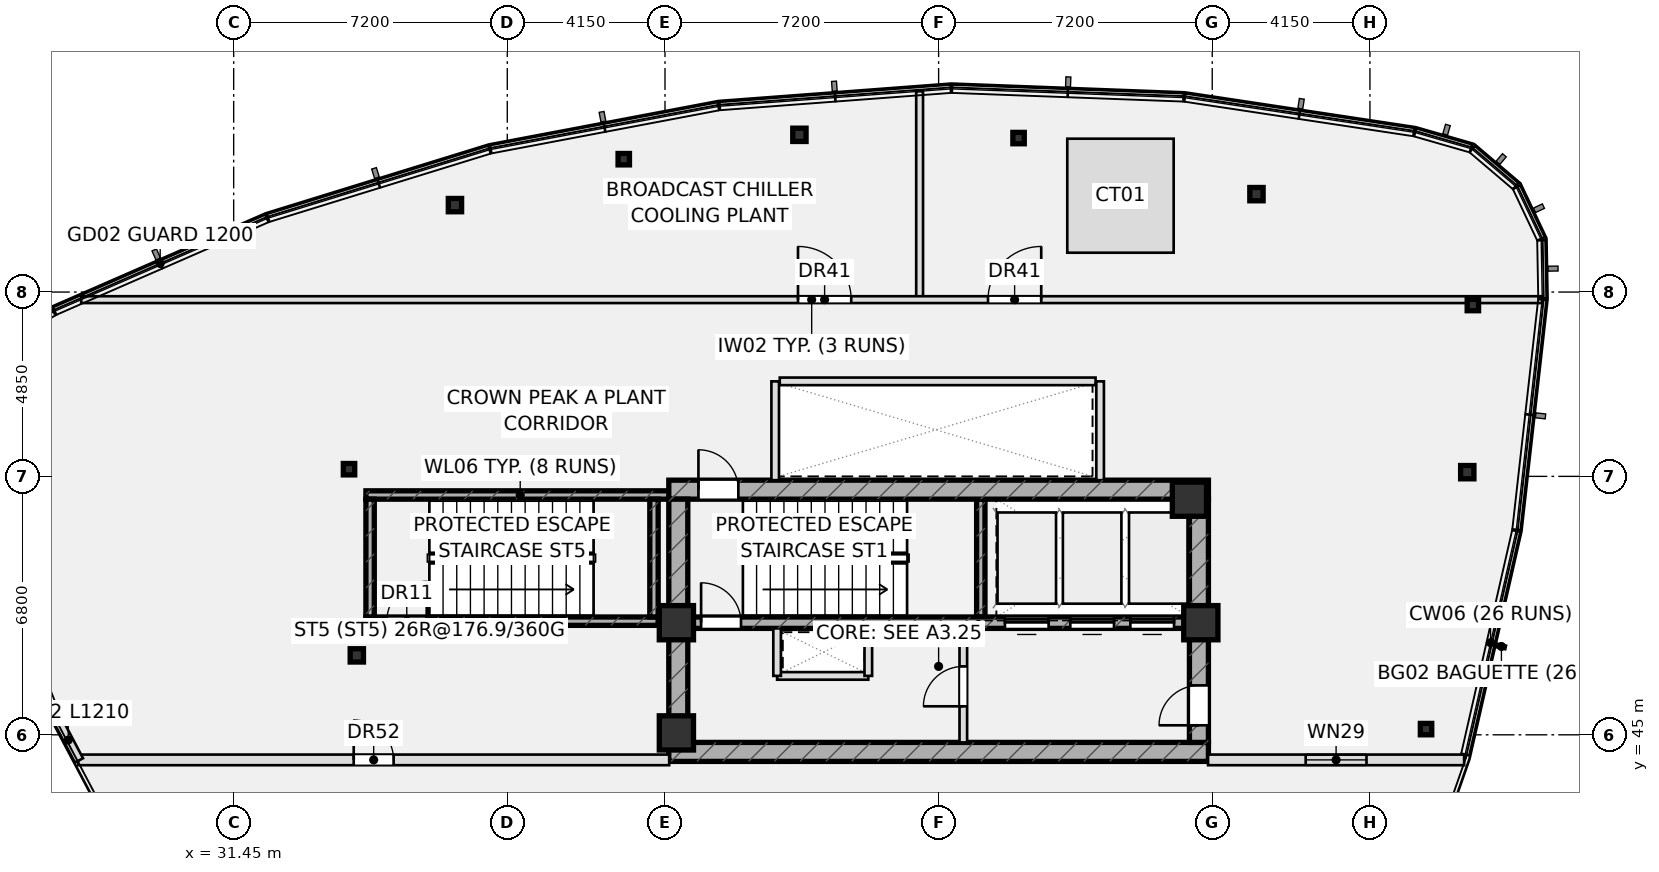
"""IFC4 building model, lengths in metres.
Left out: names, types, materials, properties, quantities, classifications, styles, units other than length and angle.
Written with IfcOpenShell. Run it as: python <this file> out.ifc"""

import sys

from ifc_helpers import new_model, si_unit, direction, frame, frame_2d, origin, origin_2d, place, context, subcontext, project, spatial, rectangle, hollow_rectangle, extrude, element, fill, save


model = new_model("IFC4")
c1 = context("Model", 3, precision=1e-05, world=origin(), true_north=direction((0.0, 1.0)))
c2 = subcontext(c1, "Body", "Model", "MODEL_VIEW")
j1 = project(units=[si_unit("LENGTHUNIT", "METRE"), si_unit("PLANEANGLEUNIT", "RADIAN")], contexts=[c1])
p1 = place(None, origin())
s1 = spatial("IfcSite", under=j1, at=p1, CompositionType="ELEMENT")
p2 = place(p1, origin())
s2 = spatial("IfcBuilding", under=s1, at=p2, CompositionType="ELEMENT")
p3 = place(p2, frame((0.0, 0.0, 332.1)))
s3 = spatial("IfcBuildingStorey", under=s2, at=p3, CompositionType="ELEMENT", Elevation=332.1)
p4 = place(p3, frame((51.11, 48.1, 0.0), z_axis=(0.0, 0.0, 1.0), x_axis=(0.0, 1.0, 0.0)))
e1 = element("IfcWall", 1, at=p4, inside=s3, PredefinedType="SHEAR", context=c2, shape_type="SweptSolid", body=[
    extrude(rectangle(XDim=3.1, YDim=0.22, at=frame_2d((1.55, 0.0))), origin(), (0.0, 0.0, 1.0), 4.25),
])
p5 = place(p3, frame((34.93, 47.99, 0.0), z_axis=(0.0, 0.0, 1.0), x_axis=(1.0, 0.0, 0.0)))
e2 = element("IfcWall", 2, at=p5, inside=s3, PredefinedType="SHEAR", context=c2, shape_type="SweptSolid", body=[
    extrude(rectangle(XDim=7.69, YDim=0.22, at=frame_2d((3.845, 0.0))), origin(), (0.0, 0.0, 1.0), 4.25),
])
p6 = place(p5, frame((0.55, 0.0, 0.0)))
e3 = element("IfcOpeningElement", 3, at=p6, cuts=e2, PredefinedType="OPENING", context=c2, shape_type="SweptSolid", body=[
    extrude(rectangle(XDim=1.05, YDim=2.2, at=frame_2d((0.525, 1.1))), frame((0.0, 0.12, 0.0), z_axis=(0.0, -1.0, 0.0), x_axis=(1.0, 0.0, 0.0)), (0.0, 0.0, 1.0), 0.24),
])
p7 = place(p3, frame((34.93, 51.31, 0.0), z_axis=(0.0, 0.0, 1.0), x_axis=(1.0, 0.0, 0.0)))
e4 = element("IfcWall", 4, at=p7, inside=s3, PredefinedType="SHEAR", context=c2, shape_type="SweptSolid", body=[
    extrude(rectangle(XDim=8.12, YDim=0.22, at=frame_2d((4.06, 0.0))), origin(), (0.0, 0.0, 1.0), 4.25),
])
for number, where, z_axis, x_axis in (
    (5, (42.51, 48.1, 0.0), (0.0, 0.0, 1.0), (0.0, 1.0, 0.0)),
    (6, (35.04, 48.1, 0.0), (0.0, 0.0, 1.0), (0.0, 1.0, 0.0)),
):
    element("IfcWall", number, at=place(p3, frame(where, z_axis=z_axis, x_axis=x_axis)), inside=s3, PredefinedType="SHEAR", context=c2, shape_type="SweptSolid", body=[
        extrude(rectangle(XDim=3.1, YDim=0.22, at=frame_2d((1.55, 0.0))), origin(), (0.0, 0.0, 1.0), 4.25),
    ])
p8 = place(p3, frame((42.9, 51.45, 0.0), z_axis=(0.0, 0.0, 1.0), x_axis=(1.0, 0.0, 0.0)))
e7 = element("IfcWall", 7, at=p8, inside=s3, PredefinedType="SHEAR", context=c2, shape_type="SweptSolid", body=[
    extrude(rectangle(XDim=14.2, YDim=0.5, at=frame_2d((7.1, 0.0))), origin(), (0.0, 0.0, 1.0), 4.25),
])
p9 = place(p8, frame((0.78, 0.0, 0.0)))
e8 = element("IfcOpeningElement", 8, at=p9, cuts=e7, PredefinedType="OPENING", context=c2, shape_type="SweptSolid", body=[
    extrude(rectangle(XDim=1.05, YDim=2.2, at=frame_2d((0.525, 1.1))), frame((0.0, 0.26, 0.0), z_axis=(0.0, -1.0, 0.0), x_axis=(1.0, 0.0, 0.0)), (0.0, 0.0, 1.0), 0.52),
])
p10 = place(p3, frame((42.9, 44.55, 0.0), z_axis=(0.0, 0.0, 1.0), x_axis=(1.0, 0.0, 0.0)))
e9 = element("IfcWall", 9, at=p10, inside=s3, PredefinedType="SHEAR", context=c2, shape_type="SweptSolid", body=[
    extrude(rectangle(XDim=14.2, YDim=0.5, at=frame_2d((7.1, 0.0))), origin(), (0.0, 0.0, 1.0), 4.25),
])
p11 = place(p3, frame((43.15, 44.8, 0.0), z_axis=(0.0, 0.0, 1.0), x_axis=(0.0, 1.0, 0.0)))
e10 = element("IfcWall", 10, at=p11, inside=s3, PredefinedType="SHEAR", context=c2, shape_type="SweptSolid", body=[
    extrude(rectangle(XDim=6.4, YDim=0.5, at=frame_2d((3.2, 0.0))), origin(), (0.0, 0.0, 1.0), 4.25),
])
p12 = place(p3, frame((56.85, 44.8, 0.0), z_axis=(0.0, 0.0, 1.0), x_axis=(0.0, 1.0, 0.0)))
e11 = element("IfcWall", 11, at=p12, inside=s3, PredefinedType="SHEAR", context=c2, shape_type="SweptSolid", body=[
    extrude(rectangle(XDim=6.4, YDim=0.5, at=frame_2d((3.2, 0.0))), origin(), (0.0, 0.0, 1.0), 4.25),
])
p13 = place(p12, frame((0.45, 0.0, 0.0)))
e12 = element("IfcOpeningElement", 12, at=p13, cuts=e11, PredefinedType="OPENING", context=c2, shape_type="SweptSolid", body=[
    extrude(rectangle(XDim=1.05, YDim=2.2, at=frame_2d((0.525, 1.1))), frame((0.0, 0.26, 0.0), z_axis=(0.0, -1.0, 0.0), x_axis=(1.0, 0.0, 0.0)), (0.0, 0.0, 1.0), 0.52),
])
p14 = place(p3, frame((43.4, 47.95, 0.0), z_axis=(0.0, 0.0, 1.0), x_axis=(1.0, 0.0, 0.0)))
e13 = element("IfcWall", 13, at=p14, inside=s3, PredefinedType="SHEAR", context=c2, shape_type="SweptSolid", body=[
    extrude(rectangle(XDim=13.2, YDim=0.3, at=frame_2d((6.6, 0.0))), origin(), (0.0, 0.0, 1.0), 4.25),
])
p15 = place(p14, frame((0.35, 0.0, 0.0)))
e14 = element("IfcOpeningElement", 14, at=p15, cuts=e13, PredefinedType="OPENING", context=c2, shape_type="SweptSolid", body=[
    extrude(rectangle(XDim=1.05, YDim=2.2, at=frame_2d((0.525, 1.1))), frame((0.0, 0.16, 0.0), z_axis=(0.0, -1.0, 0.0), x_axis=(1.0, 0.0, 0.0)), (0.0, 0.0, 1.0), 0.32),
])
p16 = place(p14, frame((8.345, 0.0, 0.0)))
e15 = element("IfcOpeningElement", 15, at=p16, cuts=e13, PredefinedType="OPENING", context=c2, shape_type="SweptSolid", body=[
    extrude(rectangle(XDim=1.15, YDim=2.2, at=frame_2d((0.575, 1.1))), frame((0.0, 0.16, 0.0), z_axis=(0.0, -1.0, 0.0), x_axis=(1.0, 0.0, 0.0)), (0.0, 0.0, 1.0), 0.32),
])
p17 = place(p14, frame((10.065, 0.0, 0.0)))
e16 = element("IfcOpeningElement", 16, at=p17, cuts=e13, PredefinedType="OPENING", context=c2, shape_type="SweptSolid", body=[
    extrude(rectangle(XDim=1.15, YDim=2.2, at=frame_2d((0.575, 1.1))), frame((0.0, 0.16, 0.0), z_axis=(0.0, -1.0, 0.0), x_axis=(1.0, 0.0, 0.0)), (0.0, 0.0, 1.0), 0.32),
])
p18 = place(p14, frame((11.645, 0.0, 0.0)))
e17 = element("IfcOpeningElement", 17, at=p18, cuts=e13, PredefinedType="OPENING", context=c2, shape_type="SweptSolid", body=[
    extrude(rectangle(XDim=1.15, YDim=2.2, at=frame_2d((0.575, 1.1))), frame((0.0, 0.16, 0.0), z_axis=(0.0, -1.0, 0.0), x_axis=(1.0, 0.0, 0.0)), (0.0, 0.0, 1.0), 0.32),
])
for number, where, z_axis, x_axis in (
    (18, (43.1, 47.95, 0.0), (0.0, 0.0, 1.0), (1.0, 0.0, 0.0)),
    (19, (56.9, 47.95, 0.0), (0.0, 0.0, 1.0), (1.0, 0.0, 0.0)),
    (20, (56.6, 51.2, 0.0), (0.0, 0.0, 1.0), (1.0, 0.0, 0.0)),
    (21, (43.1, 45.05, 0.0), (0.0, 0.0, 1.0), (1.0, 0.0, 0.0)),
):
    element("IfcColumn", number, at=place(p3, frame(where, z_axis=z_axis, x_axis=x_axis)), inside=s3, PredefinedType="COLUMN", context=c2, shape_type="SweptSolid", body=[
        extrude(rectangle(XDim=0.9, YDim=0.9, at=origin_2d()), origin(), (0.0, 0.0, 1.0), 4.25),
    ])
p19 = place(p3, frame((37.273, 58.938, 0.0), z_axis=(0.0, 0.0, 1.0), x_axis=(1.0, 0.0, 0.0)))
e22 = element("IfcColumn", 22, at=p19, inside=s3, PredefinedType="COLUMN", context=c2, shape_type="SweptSolid", body=[
    extrude(hollow_rectangle(XDim=0.35, YDim=0.35, WallThickness=0.02, at=origin_2d()), origin(), (0.0, 0.0, 1.0), 4.25),
])
p20 = place(p3, frame((34.485, 51.989, 0.0), z_axis=(0.0, 0.0, 1.0), x_axis=(1.0, 0.0, 0.0)))
e23 = element("IfcColumn", 23, at=p20, inside=s3, PredefinedType="COLUMN", context=c2, shape_type="SweptSolid", body=[
    extrude(hollow_rectangle(XDim=0.3, YDim=0.3, WallThickness=0.016, at=origin_2d()), origin(), (0.0, 0.0, 1.0), 4.25),
])
p21 = place(p3, frame((34.691, 47.09, 0.0), z_axis=(0.0, 0.0, 1.0), x_axis=(1.0, 0.0, 0.0)))
e24 = element("IfcColumn", 24, at=p21, inside=s3, PredefinedType="COLUMN", context=c2, shape_type="SweptSolid", body=[
    extrude(hollow_rectangle(XDim=0.35, YDim=0.35, WallThickness=0.02, at=origin_2d()), origin(), (0.0, 0.0, 1.0), 4.25),
])
p22 = place(p3, frame((62.826, 45.15, 0.0), z_axis=(0.0, 0.0, 1.0), x_axis=(1.0, 0.0, 0.0)))
e25 = element("IfcColumn", 25, at=p22, inside=s3, PredefinedType="COLUMN", context=c2, shape_type="SweptSolid", body=[
    extrude(hollow_rectangle(XDim=0.3, YDim=0.3, WallThickness=0.016, at=origin_2d()), origin(), (0.0, 0.0, 1.0), 4.25),
])
p23 = place(p3, frame((63.911, 51.911, 0.0), z_axis=(0.0, 0.0, 1.0), x_axis=(1.0, 0.0, 0.0)))
e26 = element("IfcColumn", 26, at=p23, inside=s3, PredefinedType="COLUMN", context=c2, shape_type="SweptSolid", body=[
    extrude(hollow_rectangle(XDim=0.35, YDim=0.35, WallThickness=0.02, at=origin_2d()), origin(), (0.0, 0.0, 1.0), 4.25),
])
p24 = place(p3, frame((64.058, 56.309, 0.0), z_axis=(0.0, 0.0, 1.0), x_axis=(1.0, 0.0, 0.0)))
e27 = element("IfcColumn", 27, at=p24, inside=s3, PredefinedType="COLUMN", context=c2, shape_type="SweptSolid", body=[
    extrude(hollow_rectangle(XDim=0.3, YDim=0.3, WallThickness=0.016, at=origin_2d()), origin(), (0.0, 0.0, 1.0), 4.25),
])
p25 = place(p3, frame((58.364, 59.226, 0.0), z_axis=(0.0, 0.0, 1.0), x_axis=(1.0, 0.0, 0.0)))
e28 = element("IfcColumn", 28, at=p25, inside=s3, PredefinedType="COLUMN", context=c2, shape_type="SweptSolid", body=[
    extrude(hollow_rectangle(XDim=0.35, YDim=0.35, WallThickness=0.02, at=origin_2d()), origin(), (0.0, 0.0, 1.0), 4.25),
])
p26 = place(p3, frame((52.104, 60.701, 0.0), z_axis=(0.0, 0.0, 1.0), x_axis=(1.0, 0.0, 0.0)))
e29 = element("IfcColumn", 29, at=p26, inside=s3, PredefinedType="COLUMN", context=c2, shape_type="SweptSolid", body=[
    extrude(hollow_rectangle(XDim=0.3, YDim=0.3, WallThickness=0.016, at=origin_2d()), origin(), (0.0, 0.0, 1.0), 4.25),
])
p27 = place(p3, frame((46.337, 60.787, 0.0), z_axis=(0.0, 0.0, 1.0), x_axis=(1.0, 0.0, 0.0)))
e30 = element("IfcColumn", 30, at=p27, inside=s3, PredefinedType="COLUMN", context=c2, shape_type="SweptSolid", body=[
    extrude(hollow_rectangle(XDim=0.35, YDim=0.35, WallThickness=0.02, at=origin_2d()), origin(), (0.0, 0.0, 1.0), 4.25),
])
p28 = place(p3, frame((41.715, 60.146, 0.0), z_axis=(0.0, 0.0, 1.0), x_axis=(1.0, 0.0, 0.0)))
e31 = element("IfcColumn", 31, at=p28, inside=s3, PredefinedType="COLUMN", context=c2, shape_type="SweptSolid", body=[
    extrude(hollow_rectangle(XDim=0.3, YDim=0.3, WallThickness=0.016, at=origin_2d()), origin(), (0.0, 0.0, 1.0), 4.25),
])
for number, where, z_axis, x_axis in (
    (32, (45.7, 51.7, 0.0), (0.0, 0.0, 1.0), (0.0, 1.0, 0.0)),
    (33, (54.25, 51.7, 0.0), (0.0, 0.0, 1.0), (0.0, 1.0, 0.0)),
):
    element("IfcWall", number, at=place(p3, frame(where, z_axis=z_axis, x_axis=x_axis)), inside=s3, PredefinedType="PARTITIONING", context=c2, shape_type="SweptSolid", body=[
        extrude(rectangle(XDim=2.6, YDim=0.2, at=frame_2d((1.3, 0.0))), origin(), (0.0, 0.0, 1.0), 4.25),
    ])
p29 = place(p3, frame((45.75, 46.55, 0.0), z_axis=(0.0, 0.0, 1.0), x_axis=(1.0, 0.0, 0.0)))
e34 = element("IfcWall", 34, at=p29, inside=s3, PredefinedType="PARTITIONING", context=c2, shape_type="SweptSolid", body=[
    extrude(rectangle(XDim=2.4, YDim=0.2, at=frame_2d((1.2, 0.0))), origin(), (0.0, 0.0, 1.0), 4.25),
])
for number, where, z_axis, x_axis in (
    (35, (48.15, 46.55, 0.0), (0.0, 0.0, 1.0), (0.0, 1.0, 0.0)),
    (36, (45.75, 46.55, 0.0), (0.0, 0.0, 1.0), (0.0, 1.0, 0.0)),
):
    element("IfcWall", number, at=place(p3, frame(where, z_axis=z_axis, x_axis=x_axis)), inside=s3, PredefinedType="PARTITIONING", context=c2, shape_type="SweptSolid", body=[
        extrude(rectangle(XDim=1.25, YDim=0.2, at=frame_2d((0.625, 0.0))), origin(), (0.0, 0.0, 1.0), 4.25),
    ])
p30 = place(p3, frame((50.65, 44.8, 0.0), z_axis=(0.0, 0.0, 1.0), x_axis=(0.0, 1.0, 0.0)))
e37 = element("IfcWall", 37, at=p30, inside=s3, PredefinedType="PARTITIONING", context=c2, shape_type="SweptSolid", body=[
    extrude(rectangle(XDim=3.0, YDim=0.2, at=frame_2d((1.5, 0.0))), origin(), (0.0, 0.0, 1.0), 4.25),
])
p31 = place(p30, frame((0.95, 0.0, 0.0)))
e38 = element("IfcOpeningElement", 38, at=p31, cuts=e37, PredefinedType="OPENING", context=c2, shape_type="SweptSolid", body=[
    extrude(rectangle(XDim=1.05, YDim=2.2, at=frame_2d((0.525, 1.1))), frame((0.0, 0.11, 0.0), z_axis=(0.0, -1.0, 0.0), x_axis=(1.0, 0.0, 0.0)), (0.0, 0.0, 1.0), 0.22),
])
p32 = place(p3, frame((49.5, 56.45, 0.0), z_axis=(0.0, 0.0, 1.0), x_axis=(0.0, 1.0, 0.0)))
e39 = element("IfcWall", 39, at=p32, inside=s3, PredefinedType="PARTITIONING", context=c2, shape_type="SweptSolid", body=[
    extrude(rectangle(XDim=5.483, YDim=0.18, at=frame_2d((2.742, 0.0))), origin(), (0.0, 0.0, 1.0), 4.25),
])
p33 = place(p3, frame((27.437, 56.45, 0.0), z_axis=(0.0, 0.0, 1.0), x_axis=(1.0, 0.0, 0.0)))
e40 = element("IfcWall", 40, at=p33, inside=s3, PredefinedType="PARTITIONING", context=c2, shape_type="SweptSolid", body=[
    extrude(rectangle(XDim=38.445, YDim=0.18, at=frame_2d((19.222, 0.0))), origin(), (0.0, 0.0, 1.0), 3.825),
])
p34 = place(p33, frame((18.863, 0.0, 0.0)))
e41 = element("IfcOpeningElement", 41, at=p34, cuts=e40, PredefinedType="OPENING", context=c2, shape_type="SweptSolid", body=[
    extrude(rectangle(XDim=1.4, YDim=2.15, at=frame_2d((0.7, 1.075))), frame((0.0, 0.1, 0.0), z_axis=(0.0, -1.0, 0.0), x_axis=(1.0, 0.0, 0.0)), (0.0, 0.0, 1.0), 0.2),
])
p35 = place(p33, frame((23.863, 0.0, 0.0)))
e42 = element("IfcOpeningElement", 42, at=p35, cuts=e40, PredefinedType="OPENING", context=c2, shape_type="SweptSolid", body=[
    extrude(rectangle(XDim=1.4, YDim=2.15, at=frame_2d((0.7, 1.075))), frame((0.0, 0.1, 0.0), z_axis=(0.0, -1.0, 0.0), x_axis=(1.0, 0.0, 0.0)), (0.0, 0.0, 1.0), 0.2),
])
p36 = place(p3, frame((27.358, 44.34, 0.0), z_axis=(0.0, 0.0, 1.0), x_axis=(1.0, 0.0, 0.0)))
e43 = element("IfcWall", 43, at=p36, inside=s3, PredefinedType="STANDARD", context=c2, shape_type="SweptSolid", body=[
    extrude(rectangle(XDim=15.552, YDim=0.28, at=frame_2d((7.776, 0.0))), origin(), (0.0, 0.0, 1.0), 4.25),
])
p37 = place(p36, frame((7.251, 0.0, 0.0)))
e44 = element("IfcOpeningElement", 44, at=p37, cuts=e43, PredefinedType="OPENING", context=c2, shape_type="SweptSolid", body=[
    extrude(rectangle(XDim=1.05, YDim=2.2, at=frame_2d((0.525, 1.1))), frame((0.0, 0.15, 0.0), z_axis=(0.0, -1.0, 0.0), x_axis=(1.0, 0.0, 0.0)), (0.0, 0.0, 1.0), 0.3),
])
p38 = place(p3, frame((57.09, 44.34, 0.0), z_axis=(0.0, 0.0, 1.0), x_axis=(1.0, 0.0, 0.0)))
e45 = element("IfcWall", 45, at=p38, inside=s3, PredefinedType="STANDARD", context=c2, shape_type="SweptSolid", body=[
    extrude(rectangle(XDim=6.738, YDim=0.28, at=frame_2d((3.369, 0.0))), origin(), (0.0, 0.0, 1.0), 4.25),
])
p39 = place(p38, frame((2.569, 0.0, 0.95)))
e46 = element("IfcOpeningElement", 46, at=p39, cuts=e45, PredefinedType="OPENING", context=c2, shape_type="SweptSolid", body=[
    extrude(rectangle(XDim=1.6, YDim=2.1, at=frame_2d((0.8, 1.05))), frame((0.0, 0.15, 0.0), z_axis=(0.0, -1.0, 0.0), x_axis=(1.0, 0.0, 0.0)), (0.0, 0.0, 1.0), 0.3),
])
p40 = place(p3, frame((26.815, 45.396, 0.0), z_axis=(0.0, 0.0, 1.0), x_axis=(0.467043623262, -0.884234275501, 0.0)))
e47 = element("IfcWall", 47, at=p40, inside=s3, PredefinedType="PARAPET", context=c2, shape_type="SweptSolid", body=[
    extrude(rectangle(XDim=1.21, YDim=0.24, at=frame_2d((0.605, 0.0))), origin(), (0.0, 0.0, 1.0), 4.25),
])
p41 = place(p3, frame((45.82, 54.3, 0.0), z_axis=(0.0, 0.0, 1.0), x_axis=(1.0, 0.0, 0.0)))
e48 = element("IfcWall", 48, at=p41, inside=s3, PredefinedType="PARTITIONING", context=c2, shape_type="SweptSolid", body=[
    extrude(rectangle(XDim=8.31, YDim=0.2, at=frame_2d((4.155, 0.0))), origin(), (0.0, 0.0, 1.0), 4.25),
])
p42 = place(p9, origin())
e49 = element("IfcDoor", 49, at=p42, inside=s3, OperationType="SINGLE_SWING_LEFT", PredefinedType="DOOR", context=c2, shape_type="SweptSolid", body=[
    extrude(rectangle(XDim=1.05, YDim=2.2, at=frame_2d((0.525, 1.1))), frame((0.0, 0.025, 0.0), z_axis=(0.0, -1.0, 0.0), x_axis=(1.0, 0.0, 0.0)), (0.0, 0.0, 1.0), 0.05),
])
fill(e8, e49)
p43 = place(p15, origin())
e50 = element("IfcDoor", 50, at=p43, inside=s3, OperationType="SINGLE_SWING_LEFT", PredefinedType="DOOR", context=c2, shape_type="SweptSolid", body=[
    extrude(rectangle(XDim=1.05, YDim=2.2, at=frame_2d((0.525, 1.1))), frame((0.0, 0.025, 0.0), z_axis=(0.0, -1.0, 0.0), x_axis=(1.0, 0.0, 0.0)), (0.0, 0.0, 1.0), 0.05),
])
fill(e14, e50)
p44 = place(p13, origin())
e51 = element("IfcDoor", 51, at=p44, inside=s3, OperationType="SINGLE_SWING_LEFT", PredefinedType="DOOR", context=c2, shape_type="SweptSolid", body=[
    extrude(rectangle(XDim=1.05, YDim=2.2, at=frame_2d((0.525, 1.1))), frame((0.0, 0.025, 0.0), z_axis=(0.0, -1.0, 0.0), x_axis=(1.0, 0.0, 0.0)), (0.0, 0.0, 1.0), 0.05),
])
fill(e12, e51)
p45 = place(p31, origin())
e52 = element("IfcDoor", 52, at=p45, inside=s3, OperationType="SINGLE_SWING_LEFT", PredefinedType="DOOR", context=c2, shape_type="SweptSolid", body=[
    extrude(rectangle(XDim=1.05, YDim=2.2, at=frame_2d((0.525, 1.1))), frame((0.0, 0.025, 0.0), z_axis=(0.0, -1.0, 0.0), x_axis=(1.0, 0.0, 0.0)), (0.0, 0.0, 1.0), 0.05),
])
fill(e38, e52)
p46 = place(p6, origin())
e53 = element("IfcDoor", 53, at=p46, inside=s3, OperationType="SINGLE_SWING_RIGHT", PredefinedType="DOOR", context=c2, shape_type="SweptSolid", body=[
    extrude(rectangle(XDim=1.05, YDim=2.2, at=frame_2d((0.525, 1.1))), frame((0.0, 0.025, 0.0), z_axis=(0.0, -1.0, 0.0), x_axis=(1.0, 0.0, 0.0)), (0.0, 0.0, 1.0), 0.05),
])
fill(e3, e53)
p47 = place(p34, origin())
e54 = element("IfcDoor", 54, at=p47, inside=s3, OperationType="SINGLE_SWING_LEFT", PredefinedType="DOOR", context=c2, shape_type="SweptSolid", body=[
    extrude(rectangle(XDim=1.4, YDim=2.15, at=frame_2d((0.7, 1.075))), frame((0.0, 0.025, 0.0), z_axis=(0.0, -1.0, 0.0), x_axis=(1.0, 0.0, 0.0)), (0.0, 0.0, 1.0), 0.05),
])
fill(e41, e54)
p48 = place(p35, origin())
e55 = element("IfcDoor", 55, at=p48, inside=s3, OperationType="SINGLE_SWING_RIGHT", PredefinedType="DOOR", context=c2, shape_type="SweptSolid", body=[
    extrude(rectangle(XDim=1.4, YDim=2.15, at=frame_2d((0.7, 1.075))), frame((0.0, 0.025, 0.0), z_axis=(0.0, -1.0, 0.0), x_axis=(1.0, 0.0, 0.0)), (0.0, 0.0, 1.0), 0.05),
])
fill(e42, e55)
p49 = place(p37, origin())
e56 = element("IfcDoor", 56, at=p49, inside=s3, OperationType="SINGLE_SWING_LEFT", PredefinedType="DOOR", context=c2, shape_type="SweptSolid", body=[
    extrude(rectangle(XDim=1.05, YDim=2.2, at=frame_2d((0.525, 1.1))), frame((0.0, 0.025, 0.0), z_axis=(0.0, -1.0, 0.0), x_axis=(1.0, 0.0, 0.0)), (0.0, 0.0, 1.0), 0.05),
])
fill(e44, e56)
p50 = place(p39, origin())
e57 = element("IfcWindow", 57, at=p50, inside=s3, PartitioningType="SINGLE_PANEL", PredefinedType="WINDOW", context=c2, shape_type="SweptSolid", body=[
    extrude(rectangle(XDim=1.6, YDim=2.1, at=frame_2d((0.8, 1.05))), frame((0.0, 0.03, 0.0), z_axis=(0.0, -1.0, 0.0), x_axis=(1.0, 0.0, 0.0)), (0.0, 0.0, 1.0), 0.06),
])
fill(e46, e57)
p51 = place(p16, origin())
e58 = element("IfcDoor", 58, at=p51, inside=s3, OperationType="SLIDING_TO_LEFT", PredefinedType="DOOR", context=c2, shape_type="SweptSolid", body=[
    extrude(rectangle(XDim=1.15, YDim=2.2, at=frame_2d((0.575, 1.1))), frame((0.0, 0.025, 0.0), z_axis=(0.0, -1.0, 0.0), x_axis=(1.0, 0.0, 0.0)), (0.0, 0.0, 1.0), 0.05),
])
fill(e15, e58)
p52 = place(p17, origin())
e59 = element("IfcDoor", 59, at=p52, inside=s3, OperationType="SLIDING_TO_LEFT", PredefinedType="DOOR", context=c2, shape_type="SweptSolid", body=[
    extrude(rectangle(XDim=1.15, YDim=2.2, at=frame_2d((0.575, 1.1))), frame((0.0, 0.025, 0.0), z_axis=(0.0, -1.0, 0.0), x_axis=(1.0, 0.0, 0.0)), (0.0, 0.0, 1.0), 0.05),
])
fill(e16, e59)
p53 = place(p18, origin())
e60 = element("IfcDoor", 60, at=p53, inside=s3, OperationType="SLIDING_TO_LEFT", PredefinedType="DOOR", context=c2, shape_type="SweptSolid", body=[
    extrude(rectangle(XDim=1.15, YDim=2.2, at=frame_2d((0.575, 1.1))), frame((0.0, 0.025, 0.0), z_axis=(0.0, -1.0, 0.0), x_axis=(1.0, 0.0, 0.0)), (0.0, 0.0, 1.0), 0.05),
])
fill(e17, e60)
save(model, sys.argv[1])
